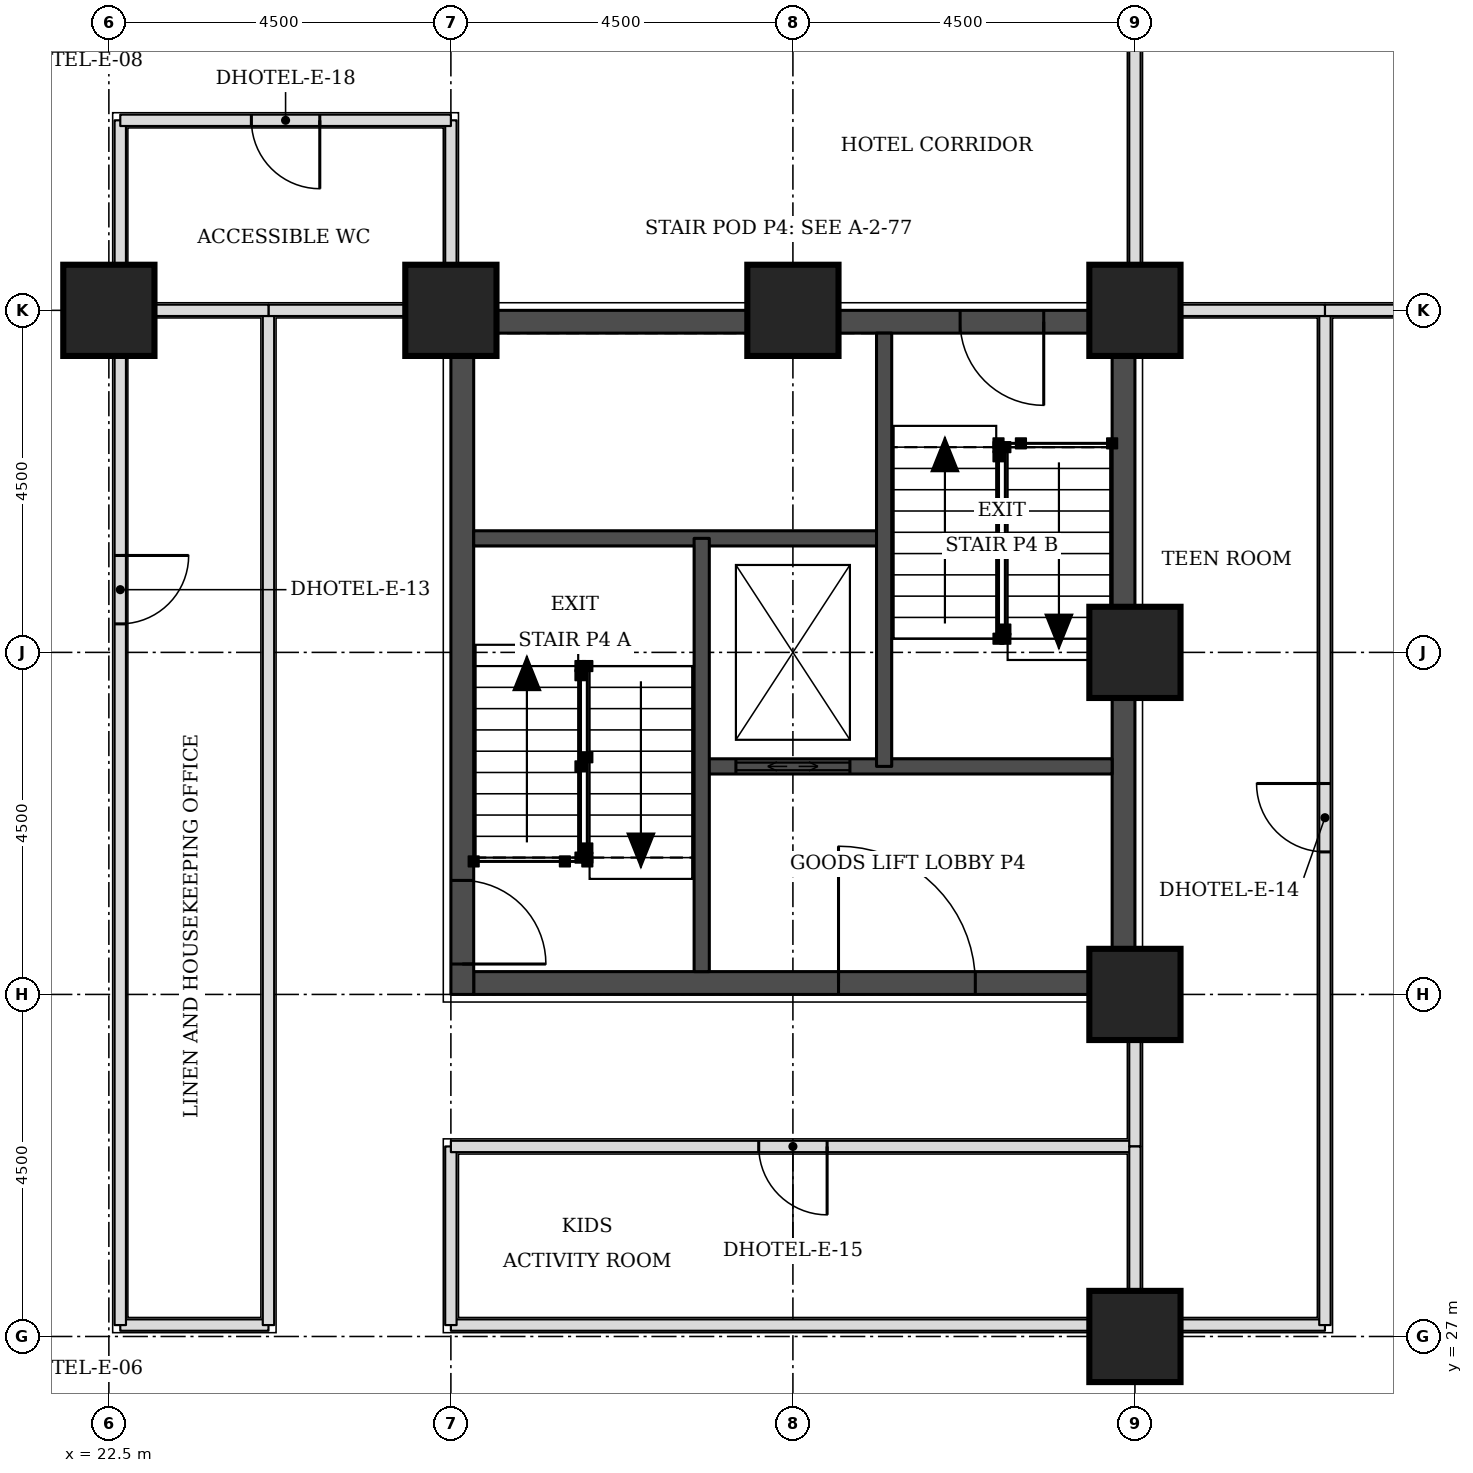
"""IFC4 building model, lengths in metres.
Left out: names, types, materials, properties, quantities, classifications, styles, units other than length and angle.
Written with IfcOpenShell. Run it as: python <this file> out.ifc"""

import sys

from ifc_helpers import new_model, si_unit, direction, frame, frame_2d, origin, origin_2d, place, context, subcontext, project, spatial, rectangle, extrude, element, fill, save


model = new_model("IFC4")
c1 = context("Model", 3, precision=1e-05, world=origin(), true_north=direction((0.0, 1.0)))
c2 = subcontext(c1, "Body", "Model", "MODEL_VIEW")
j1 = project(units=[si_unit("LENGTHUNIT", "METRE"), si_unit("PLANEANGLEUNIT", "RADIAN")], contexts=[c1])
p1 = place(None, origin())
s1 = spatial("IfcSite", under=j1, at=p1, CompositionType="ELEMENT")
p2 = place(p1, origin())
s2 = spatial("IfcBuilding", under=s1, at=p2, CompositionType="ELEMENT")
p3 = place(p2, frame((0.0, 0.0, 39.6)))
s3 = spatial("IfcBuildingStorey", under=s2, at=p3, CompositionType="ELEMENT", Elevation=39.6)
for number, where, z_axis, x_axis in (
    (1, (36.0, 27.0, 0.0), (0.0, 0.0, 1.0), (1.0, 0.0, 0.0)),
    (2, (36.0, 31.5, 0.0), (0.0, 0.0, 1.0), (1.0, 0.0, 0.0)),
    (3, (36.0, 36.0, 0.0), (0.0, 0.0, 1.0), (1.0, 0.0, 0.0)),
    (4, (22.5, 40.5, 0.0), (0.0, 0.0, 1.0), (1.0, 0.0, 0.0)),
    (5, (27.0, 40.5, 0.0), (0.0, 0.0, 1.0), (1.0, 0.0, 0.0)),
    (6, (31.5, 40.5, 0.0), (0.0, 0.0, 1.0), (1.0, 0.0, 0.0)),
    (7, (36.0, 40.5, 0.0), (0.0, 0.0, 1.0), (1.0, 0.0, 0.0)),
):
    element("IfcColumn", number, at=place(p3, frame(where, z_axis=z_axis, x_axis=x_axis)), inside=s3, PredefinedType="COLUMN", context=c2, shape_type="SweptSolid", body=[
        extrude(rectangle(XDim=1.2, YDim=1.2, at=origin_2d()), origin(), (0.0, 0.0, 1.0), 3.3),
    ])
p4 = place(p3, frame((27.3, 31.65, 0.0), z_axis=(0.0, 0.0, 1.0), x_axis=(1.0, 0.0, 0.0)))
e8 = element("IfcWall", 8, at=p4, inside=s3, PredefinedType="SHEAR", context=c2, shape_type="SweptSolid", body=[
    extrude(rectangle(XDim=8.4, YDim=0.3, at=frame_2d((4.2, 0.0))), origin(), (0.0, 0.0, 1.0), 3.3),
])
p5 = place(p4, frame((4.8, 0.0, 0.0)))
e9 = element("IfcOpeningElement", 9, at=p5, cuts=e8, PredefinedType="OPENING", context=c2, shape_type="SweptSolid", body=[
    extrude(rectangle(XDim=1.8, YDim=2.1, at=frame_2d((0.9, 1.05))), frame((0.0, 0.16, 0.0), z_axis=(0.0, -1.0, 0.0), x_axis=(1.0, 0.0, 0.0)), (0.0, 0.0, 1.0), 0.32),
])
p6 = place(p3, frame((27.3, 40.35, 0.0), z_axis=(0.0, 0.0, 1.0), x_axis=(1.0, 0.0, 0.0)))
e10 = element("IfcWall", 10, at=p6, inside=s3, PredefinedType="SHEAR", context=c2, shape_type="SweptSolid", body=[
    extrude(rectangle(XDim=8.4, YDim=0.3, at=frame_2d((4.2, 0.0))), origin(), (0.0, 0.0, 1.0), 3.3),
])
p7 = place(p6, frame((6.4, 0.0, 0.0)))
e11 = element("IfcOpeningElement", 11, at=p7, cuts=e10, PredefinedType="OPENING", context=c2, shape_type="SweptSolid", body=[
    extrude(rectangle(XDim=1.1, YDim=2.1, at=frame_2d((0.55, 1.05))), frame((0.0, 0.16, 0.0), z_axis=(0.0, -1.0, 0.0), x_axis=(1.0, 0.0, 0.0)), (0.0, 0.0, 1.0), 0.32),
])
p8 = place(p3, frame((27.15, 31.5, 0.0), z_axis=(0.0, 0.0, 1.0), x_axis=(0.0, 1.0, 0.0)))
e12 = element("IfcWall", 12, at=p8, inside=s3, PredefinedType="SHEAR", context=c2, shape_type="SweptSolid", body=[
    extrude(rectangle(XDim=9.0, YDim=0.3, at=frame_2d((4.5, 0.0))), origin(), (0.0, 0.0, 1.0), 3.3),
])
p9 = place(p8, frame((0.4, 0.0, 0.0)))
e13 = element("IfcOpeningElement", 13, at=p9, cuts=e12, PredefinedType="OPENING", context=c2, shape_type="SweptSolid", body=[
    extrude(rectangle(XDim=1.1, YDim=2.1, at=frame_2d((0.55, 1.05))), frame((0.0, 0.16, 0.0), z_axis=(0.0, -1.0, 0.0), x_axis=(1.0, 0.0, 0.0)), (0.0, 0.0, 1.0), 0.32),
])
p10 = place(p3, frame((35.85, 31.5, 0.0), z_axis=(0.0, 0.0, 1.0), x_axis=(0.0, 1.0, 0.0)))
e14 = element("IfcWall", 14, at=p10, inside=s3, PredefinedType="SHEAR", context=c2, shape_type="SweptSolid", body=[
    extrude(rectangle(XDim=9.0, YDim=0.3, at=frame_2d((4.5, 0.0))), origin(), (0.0, 0.0, 1.0), 3.3),
])
p11 = place(p3, frame((22.65, 27.15, 0.0), z_axis=(0.0, 0.0, 1.0), x_axis=(1.0, 0.0, 0.0)))
e15 = element("IfcWall", 15, at=p11, inside=s3, PredefinedType="PARTITIONING", context=c2, shape_type="SweptSolid", body=[
    extrude(rectangle(XDim=1.95, YDim=0.15, at=frame_2d((0.975, 0.0))), origin(), (0.0, 0.0, 1.0), 3.08),
])
p12 = place(p3, frame((22.65, 27.15, 0.0), z_axis=(0.0, 0.0, 1.0), x_axis=(0.0, 1.0, 0.0)))
e16 = element("IfcWall", 16, at=p12, inside=s3, PredefinedType="PARTITIONING", context=c2, shape_type="SweptSolid", body=[
    extrude(rectangle(XDim=15.85, YDim=0.15, at=frame_2d((7.925, 0.0))), origin(), (0.0, 0.0, 1.0), 3.08),
])
p13 = place(p12, frame((9.225, 0.0, 0.0)))
e17 = element("IfcOpeningElement", 17, at=p13, cuts=e16, PredefinedType="OPENING", context=c2, shape_type="SweptSolid", body=[
    extrude(rectangle(XDim=0.9, YDim=2.1, at=frame_2d((0.45, 1.05))), frame((0.0, 0.085, 0.0), z_axis=(0.0, -1.0, 0.0), x_axis=(1.0, 0.0, 0.0)), (0.0, 0.0, 1.0), 0.17),
])
p14 = place(p3, frame((24.6, 27.15, 0.0), z_axis=(0.0, 0.0, 1.0), x_axis=(0.0, 1.0, 0.0)))
e18 = element("IfcWall", 18, at=p14, inside=s3, PredefinedType="PARTITIONING", context=c2, shape_type="SweptSolid", body=[
    extrude(rectangle(XDim=13.35, YDim=0.15, at=frame_2d((6.675, 0.0))), origin(), (0.0, 0.0, 1.0), 3.08),
])
p15 = place(p3, frame((27.0, 27.15, 0.0), z_axis=(0.0, 0.0, 1.0), x_axis=(1.0, 0.0, 0.0)))
e19 = element("IfcWall", 19, at=p15, inside=s3, PredefinedType="PARTITIONING", context=c2, shape_type="SweptSolid", body=[
    extrude(rectangle(XDim=11.5, YDim=0.15, at=frame_2d((5.75, 0.0))), origin(), (0.0, 0.0, 1.0), 3.08),
])
p16 = place(p3, frame((27.0, 27.15, 0.0), z_axis=(0.0, 0.0, 1.0), x_axis=(0.0, 1.0, 0.0)))
e20 = element("IfcWall", 20, at=p16, inside=s3, PredefinedType="PARTITIONING", context=c2, shape_type="SweptSolid", body=[
    extrude(rectangle(XDim=2.35, YDim=0.15, at=frame_2d((1.175, 0.0))), origin(), (0.0, 0.0, 1.0), 3.08),
])
p17 = place(p3, frame((38.5, 27.15, 0.0), z_axis=(0.0, 0.0, 1.0), x_axis=(0.0, 1.0, 0.0)))
e21 = element("IfcWall", 21, at=p17, inside=s3, PredefinedType="PARTITIONING", context=c2, shape_type="SweptSolid", body=[
    extrude(rectangle(XDim=13.35, YDim=0.15, at=frame_2d((6.675, 0.0))), origin(), (0.0, 0.0, 1.0), 3.08),
])
p18 = place(p17, frame((6.225, 0.0, 0.0)))
e22 = element("IfcOpeningElement", 22, at=p18, cuts=e21, PredefinedType="OPENING", context=c2, shape_type="SweptSolid", body=[
    extrude(rectangle(XDim=0.9, YDim=2.1, at=frame_2d((0.45, 1.05))), frame((0.0, 0.085, 0.0), z_axis=(0.0, -1.0, 0.0), x_axis=(1.0, 0.0, 0.0)), (0.0, 0.0, 1.0), 0.17),
])
p19 = place(p3, frame((27.0, 29.5, 0.0), z_axis=(0.0, 0.0, 1.0), x_axis=(1.0, 0.0, 0.0)))
e23 = element("IfcWall", 23, at=p19, inside=s3, PredefinedType="PARTITIONING", context=c2, shape_type="SweptSolid", body=[
    extrude(rectangle(XDim=9.0, YDim=0.15, at=frame_2d((4.5, 0.0))), origin(), (0.0, 0.0, 1.0), 3.08),
])
p20 = place(p19, frame((4.05, 0.0, 0.0)))
e24 = element("IfcOpeningElement", 24, at=p20, cuts=e23, PredefinedType="OPENING", context=c2, shape_type="SweptSolid", body=[
    extrude(rectangle(XDim=0.9, YDim=2.1, at=frame_2d((0.45, 1.05))), frame((0.0, 0.085, 0.0), z_axis=(0.0, -1.0, 0.0), x_axis=(1.0, 0.0, 0.0)), (0.0, 0.0, 1.0), 0.17),
])
p21 = place(p3, frame((36.0, 29.5, 0.0), z_axis=(0.0, 0.0, 1.0), x_axis=(0.0, 1.0, 0.0)))
e25 = element("IfcWall", 25, at=p21, inside=s3, PredefinedType="PARTITIONING", context=c2, shape_type="SweptSolid", body=[
    extrude(rectangle(XDim=1.95, YDim=0.15, at=frame_2d((0.975, 0.0))), origin(), (0.0, 0.0, 1.0), 2.33),
])
p22 = place(p3, frame((24.6, 40.5, 0.0), z_axis=(0.0, 0.0, 1.0), x_axis=(1.0, 0.0, 0.0)))
e26 = element("IfcWall", 26, at=p22, inside=s3, PredefinedType="PARTITIONING", context=c2, shape_type="SweptSolid", body=[
    extrude(rectangle(XDim=2.35, YDim=0.15, at=frame_2d((1.175, 0.0))), origin(), (0.0, 0.0, 1.0), 2.33),
])
p23 = place(p3, frame((38.5, 40.5, 0.0), z_axis=(0.0, 0.0, 1.0), x_axis=(1.0, 0.0, 0.0)))
e27 = element("IfcWall", 27, at=p23, inside=s3, PredefinedType="PARTITIONING", context=c2, shape_type="SweptSolid", body=[
    extrude(rectangle(XDim=1.95, YDim=0.15, at=frame_2d((0.975, 0.0))), origin(), (0.0, 0.0, 1.0), 2.33),
])
p24 = place(p3, frame((27.0, 40.55, 0.0), z_axis=(0.0, 0.0, 1.0), x_axis=(0.0, 1.0, 0.0)))
e28 = element("IfcWall", 28, at=p24, inside=s3, PredefinedType="PARTITIONING", context=c2, shape_type="SweptSolid", body=[
    extrude(rectangle(XDim=2.45, YDim=0.15, at=frame_2d((1.225, 0.0))), origin(), (0.0, 0.0, 1.0), 3.08),
])
p25 = place(p3, frame((36.0, 40.55, 0.0), z_axis=(0.0, 0.0, 1.0), x_axis=(0.0, 1.0, 0.0)))
e29 = element("IfcWall", 29, at=p25, inside=s3, PredefinedType="PARTITIONING", context=c2, shape_type="SweptSolid", body=[
    extrude(rectangle(XDim=4.4, YDim=0.15, at=frame_2d((2.2, 0.0))), origin(), (0.0, 0.0, 1.0), 2.33),
])
p26 = place(p3, frame((22.65, 43.0, 0.0), z_axis=(0.0, 0.0, 1.0), x_axis=(1.0, 0.0, 0.0)))
e30 = element("IfcWall", 30, at=p26, inside=s3, PredefinedType="PARTITIONING", context=c2, shape_type="SweptSolid", body=[
    extrude(rectangle(XDim=4.35, YDim=0.15, at=frame_2d((2.175, 0.0))), origin(), (0.0, 0.0, 1.0), 3.08),
])
p27 = place(p26, frame((1.725, 0.0, 0.0)))
e31 = element("IfcOpeningElement", 31, at=p27, cuts=e30, PredefinedType="OPENING", context=c2, shape_type="SweptSolid", body=[
    extrude(rectangle(XDim=0.9, YDim=2.1, at=frame_2d((0.45, 1.05))), frame((0.0, 0.085, 0.0), z_axis=(0.0, -1.0, 0.0), x_axis=(1.0, 0.0, 0.0)), (0.0, 0.0, 1.0), 0.17),
])
p28 = place(p3, frame((36.0, 27.15, 0.0), z_axis=(0.0, 0.0, 1.0), x_axis=(0.0, 1.0, 0.0)))
e32 = element("IfcWall", 32, at=p28, inside=s3, PredefinedType="PARTITIONING", context=c2, shape_type="SweptSolid", body=[
    extrude(rectangle(XDim=2.35, YDim=0.15, at=frame_2d((1.175, 0.0))), origin(), (0.0, 0.0, 1.0), 2.33),
])
p29 = place(p3, frame((22.65, 40.5, 0.0), z_axis=(0.0, 0.0, 1.0), x_axis=(1.0, 0.0, 0.0)))
e33 = element("IfcWall", 33, at=p29, inside=s3, PredefinedType="PARTITIONING", context=c2, shape_type="SweptSolid", body=[
    extrude(rectangle(XDim=1.95, YDim=0.15, at=frame_2d((0.975, 0.0))), origin(), (0.0, 0.0, 1.0), 2.33),
])
p30 = place(p3, frame((36.05, 40.5, 0.0), z_axis=(0.0, 0.0, 1.0), x_axis=(1.0, 0.0, 0.0)))
e34 = element("IfcWall", 34, at=p30, inside=s3, PredefinedType="PARTITIONING", context=c2, shape_type="SweptSolid", body=[
    extrude(rectangle(XDim=2.45, YDim=0.15, at=frame_2d((1.225, 0.0))), origin(), (0.0, 0.0, 1.0), 2.33),
])
p31 = place(p3, frame((30.3, 34.5, 0.0), z_axis=(0.0, 0.0, 1.0), x_axis=(1.0, 0.0, 0.0)))
e35 = element("IfcWall", 35, at=p31, inside=s3, PredefinedType="SOLIDWALL", context=c2, shape_type="SweptSolid", body=[
    extrude(rectangle(XDim=5.4, YDim=0.2, at=frame_2d((2.7, 0.0))), origin(), (0.0, 0.0, 1.0), 3.08),
])
p32 = place(p31, frame((0.45, 0.0, 0.0)))
e36 = element("IfcOpeningElement", 36, at=p32, cuts=e35, PredefinedType="OPENING", context=c2, shape_type="SweptSolid", body=[
    extrude(rectangle(XDim=1.5, YDim=2.1, at=frame_2d((0.75, 1.05))), frame((0.0, 0.11, 0.0), z_axis=(0.0, -1.0, 0.0), x_axis=(1.0, 0.0, 0.0)), (0.0, 0.0, 1.0), 0.22),
])
p33 = place(p3, frame((27.3, 37.5, 0.0), z_axis=(0.0, 0.0, 1.0), x_axis=(1.0, 0.0, 0.0)))
e37 = element("IfcWall", 37, at=p33, inside=s3, PredefinedType="SOLIDWALL", context=c2, shape_type="SweptSolid", body=[
    extrude(rectangle(XDim=5.4, YDim=0.2, at=frame_2d((2.7, 0.0))), origin(), (0.0, 0.0, 1.0), 3.08),
])
for number, where, z_axis, x_axis in (
    (38, (30.3, 31.8, 0.0), (0.0, 0.0, 1.0), (0.0, 1.0, 0.0)),
    (39, (32.7, 34.5, 0.0), (0.0, 0.0, 1.0), (0.0, 1.0, 0.0)),
):
    element("IfcWall", number, at=place(p3, frame(where, z_axis=z_axis, x_axis=x_axis)), inside=s3, PredefinedType="SOLIDWALL", context=c2, shape_type="SweptSolid", body=[
        extrude(rectangle(XDim=5.7, YDim=0.2, at=frame_2d((2.85, 0.0))), origin(), (0.0, 0.0, 1.0), 3.08),
    ])
p34 = place(p13, frame((0.9, 0.0, 0.0), z_axis=(0.0, 0.0, 1.0), x_axis=(-1.0, 0.0, 0.0)))
e40 = element("IfcDoor", 40, at=p34, inside=s3, OperationType="SINGLE_SWING_LEFT", PredefinedType="DOOR", context=c2, shape_type="SweptSolid", body=[
    extrude(rectangle(XDim=0.9, YDim=2.1, at=frame_2d((0.45, 1.05))), frame((0.0, 0.025, 0.0), z_axis=(0.0, -1.0, 0.0), x_axis=(1.0, 0.0, 0.0)), (0.0, 0.0, 1.0), 0.05),
])
fill(e17, e40)
p35 = place(p20, frame((0.9, 0.0, 0.0), z_axis=(0.0, 0.0, 1.0), x_axis=(-1.0, 0.0, 0.0)))
e41 = element("IfcDoor", 41, at=p35, inside=s3, OperationType="SINGLE_SWING_LEFT", PredefinedType="DOOR", context=c2, shape_type="SweptSolid", body=[
    extrude(rectangle(XDim=0.9, YDim=2.1, at=frame_2d((0.45, 1.05))), frame((0.0, 0.025, 0.0), z_axis=(0.0, -1.0, 0.0), x_axis=(1.0, 0.0, 0.0)), (0.0, 0.0, 1.0), 0.05),
])
fill(e24, e41)
p36 = place(p18, origin())
e42 = element("IfcDoor", 42, at=p36, inside=s3, OperationType="SINGLE_SWING_RIGHT", PredefinedType="DOOR", context=c2, shape_type="SweptSolid", body=[
    extrude(rectangle(XDim=0.9, YDim=2.1, at=frame_2d((0.45, 1.05))), frame((0.0, 0.025, 0.0), z_axis=(0.0, -1.0, 0.0), x_axis=(1.0, 0.0, 0.0)), (0.0, 0.0, 1.0), 0.05),
])
fill(e22, e42)
p37 = place(p27, frame((0.9, 0.0, 0.0), z_axis=(0.0, 0.0, 1.0), x_axis=(-1.0, 0.0, 0.0)))
e43 = element("IfcDoor", 43, at=p37, inside=s3, OperationType="SINGLE_SWING_LEFT", PredefinedType="DOOR", context=c2, shape_type="SweptSolid", body=[
    extrude(rectangle(XDim=0.9, YDim=2.1, at=frame_2d((0.45, 1.05))), frame((0.0, 0.025, 0.0), z_axis=(0.0, -1.0, 0.0), x_axis=(1.0, 0.0, 0.0)), (0.0, 0.0, 1.0), 0.05),
])
fill(e31, e43)
p38 = place(p9, frame((1.1, 0.0, 0.0), z_axis=(0.0, 0.0, 1.0), x_axis=(-1.0, 0.0, 0.0)))
e44 = element("IfcDoor", 44, at=p38, inside=s3, OperationType="SINGLE_SWING_RIGHT", PredefinedType="DOOR", context=c2, shape_type="SweptSolid", body=[
    extrude(rectangle(XDim=1.1, YDim=2.1, at=frame_2d((0.55, 1.05))), frame((0.0, 0.025, 0.0), z_axis=(0.0, -1.0, 0.0), x_axis=(1.0, 0.0, 0.0)), (0.0, 0.0, 1.0), 0.05),
])
fill(e13, e44)
p39 = place(p7, frame((1.1, 0.0, 0.0), z_axis=(0.0, 0.0, 1.0), x_axis=(-1.0, 0.0, 0.0)))
e45 = element("IfcDoor", 45, at=p39, inside=s3, OperationType="SINGLE_SWING_LEFT", PredefinedType="DOOR", context=c2, shape_type="SweptSolid", body=[
    extrude(rectangle(XDim=1.1, YDim=2.1, at=frame_2d((0.55, 1.05))), frame((0.0, 0.025, 0.0), z_axis=(0.0, -1.0, 0.0), x_axis=(1.0, 0.0, 0.0)), (0.0, 0.0, 1.0), 0.05),
])
fill(e11, e45)
p40 = place(p32, origin())
e46 = element("IfcDoor", 46, at=p40, inside=s3, OperationType="DOUBLE_DOOR_SLIDING", PredefinedType="DOOR", context=c2, shape_type="SweptSolid", body=[
    extrude(rectangle(XDim=1.5, YDim=2.1, at=frame_2d((0.75, 1.05))), frame((0.0, 0.025, 0.0), z_axis=(0.0, -1.0, 0.0), x_axis=(1.0, 0.0, 0.0)), (0.0, 0.0, 1.0), 0.05),
])
fill(e36, e46)
p41 = place(p5, origin())
e47 = element("IfcDoor", 47, at=p41, inside=s3, OperationType="SINGLE_SWING_LEFT", PredefinedType="DOOR", context=c2, shape_type="SweptSolid", body=[
    extrude(rectangle(XDim=1.8, YDim=2.1, at=frame_2d((0.9, 1.05))), frame((0.0, 0.025, 0.0), z_axis=(0.0, -1.0, 0.0), x_axis=(1.0, 0.0, 0.0)), (0.0, 0.0, 1.0), 0.05),
])
fill(e9, e47)
save(model, sys.argv[1])
